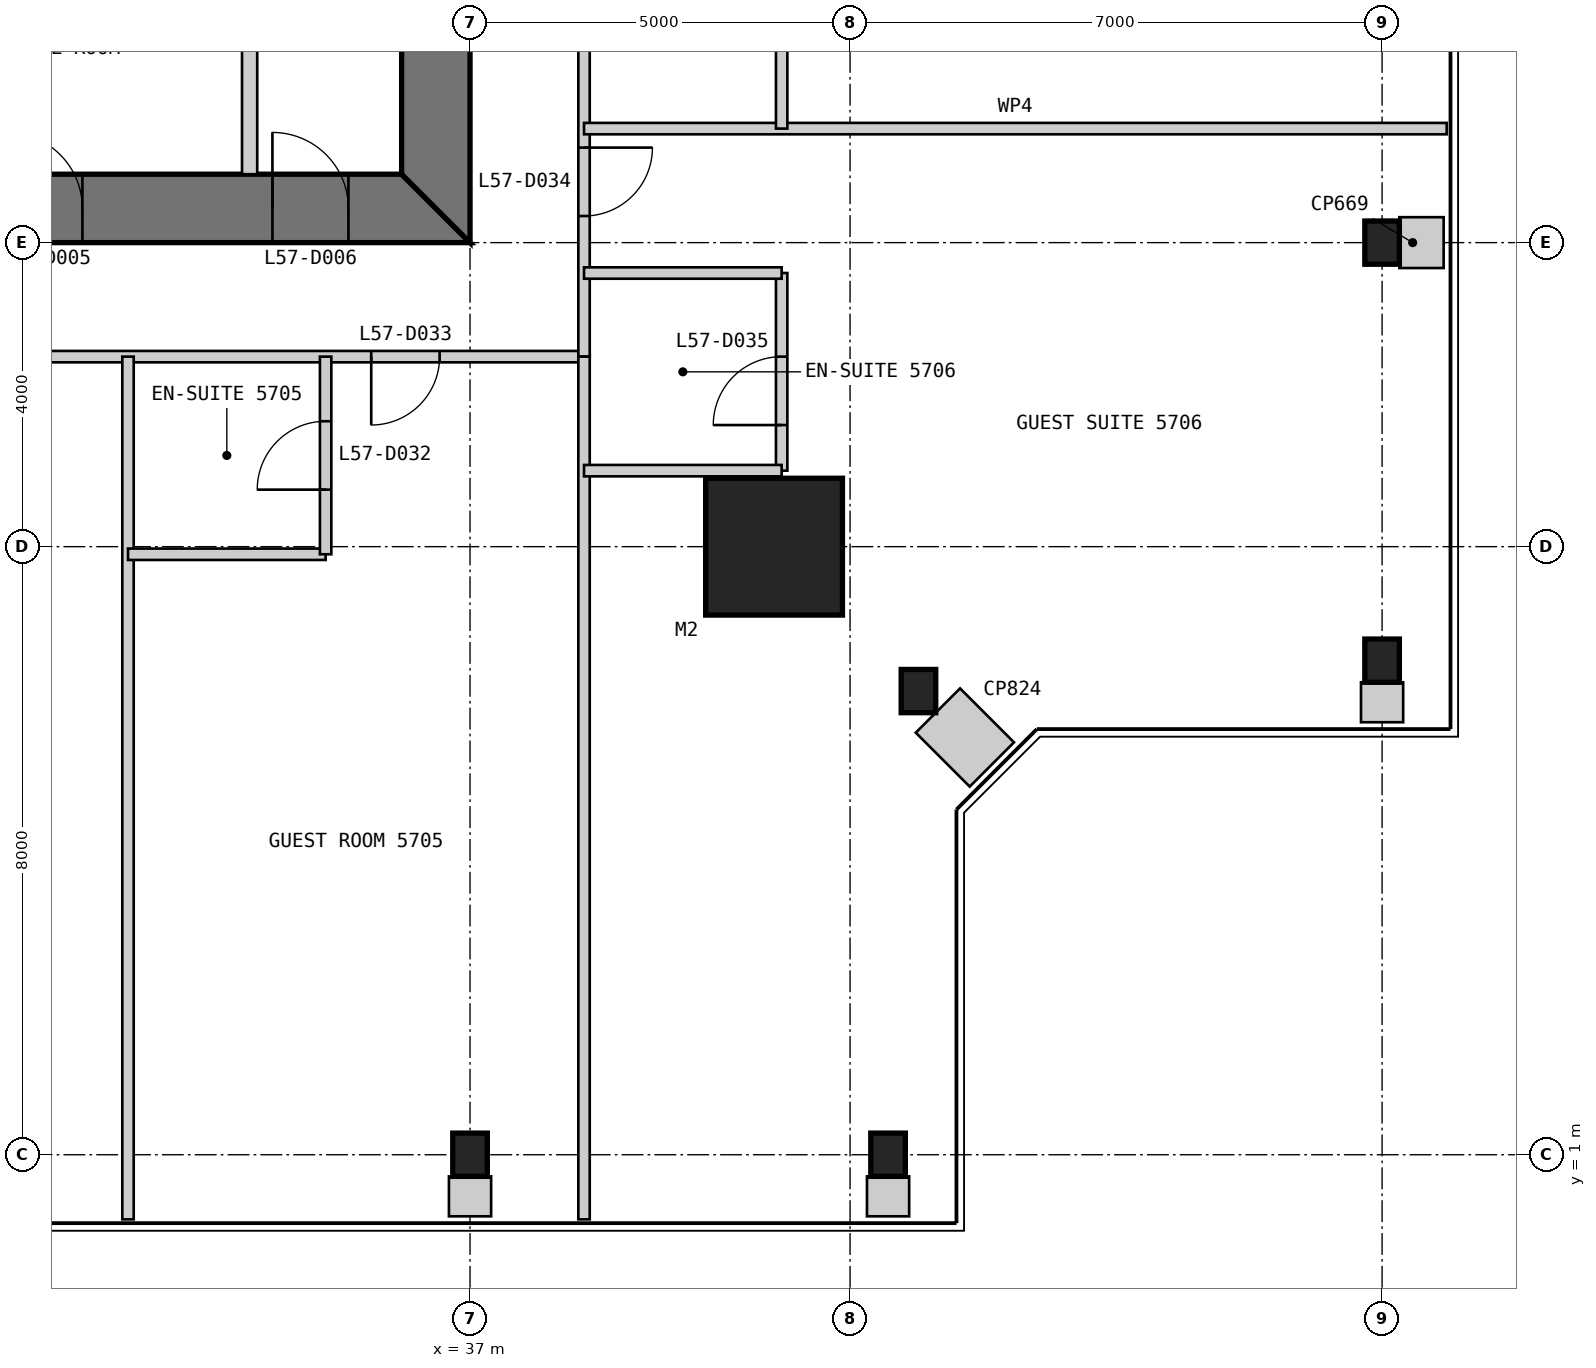
"""IFC4 building model, lengths in metres.
Left out: names, types, materials, properties, quantities, classifications, styles, units other than length and angle.
Written with IfcOpenShell. Run it as: python <this file> out.ifc"""

import sys

from ifc_helpers import new_model, si_unit, direction, frame, frame_2d, origin, origin_2d, place, context, subcontext, project, spatial, polyline, rectangle, i_section, outline, extrude, element, fill, save


model = new_model("IFC4")
c1 = context("Model", 3, precision=1e-05, world=origin(), true_north=direction((0.0, 1.0)))
c2 = subcontext(c1, "Body", "Model", "MODEL_VIEW")
j1 = project(units=[si_unit("LENGTHUNIT", "METRE"), si_unit("PLANEANGLEUNIT", "RADIAN")], contexts=[c1])
p1 = place(None, origin())
s1 = spatial("IfcSite", under=j1, at=p1, CompositionType="ELEMENT")
p2 = place(p1, origin())
s2 = spatial("IfcBuilding", under=s1, at=p2, CompositionType="ELEMENT")
p3 = place(p2, frame((0.0, 0.0, 245.8)))
s3 = spatial("IfcBuildingStorey", under=s2, at=p3, CompositionType="ELEMENT", Elevation=245.8)
p4 = place(p3, frame((41.0, 9.0, 0.0), z_axis=(0.0, 0.0, 1.0), x_axis=(1.0, 0.0, 0.0)))
e1 = element("IfcColumn", 1, at=p4, inside=s3, PredefinedType="COLUMN", context=c2, shape_type="SweptSolid", body=[
    extrude(rectangle(XDim=1.8, YDim=1.8, at=origin_2d()), origin(), (0.0, 0.0, 1.0), 3.4),
])
for number, where, z_axis, x_axis in (
    (2, (37.0, 1.0, 0.0), (0.0, 0.0, 1.0), (1.0, 0.0, 0.0)),
    (3, (42.5, 1.0, 0.0), (0.0, 0.0, 1.0), (1.0, 0.0, 0.0)),
    (4, (42.9, 7.1, 0.0), (0.0, 0.0, 1.0), (1.0, 0.0, 0.0)),
    (5, (49.0, 7.5, 0.0), (0.0, 0.0, 1.0), (1.0, 0.0, 0.0)),
    (6, (49.0, 13.0, 0.0), (0.0, 0.0, 1.0), (1.0, 0.0, 0.0)),
):
    element("IfcColumn", number, at=place(p3, frame(where, z_axis=z_axis, x_axis=x_axis)), inside=s3, PredefinedType="COLUMN", context=c2, shape_type="SweptSolid", body=[
        extrude(i_section(OverallWidth=0.455, OverallDepth=0.569, WebThickness=0.078, FlangeThickness=0.125, at=origin_2d()), origin(), (0.0, 0.0, 1.0), 3.4),
    ])
p5 = place(p3, frame((13.0, 13.45, 0.0), z_axis=(0.0, 0.0, 1.0), x_axis=(1.0, 0.0, 0.0)))
e7 = element("IfcWall", 7, at=p5, inside=s3, PredefinedType="SHEAR", context=c2, shape_type="SweptSolid", body=[
    extrude(outline(polyline([(0.0, -0.45), (24.0, -0.45), (23.1, 0.45), (0.9, 0.45), (0.0, -0.45)])), origin(), (0.0, 0.0, 1.0), 3.4),
])
p6 = place(p5, frame((4.9, 0.0, 0.0)))
e8 = element("IfcOpeningElement", 8, at=p6, cuts=e7, PredefinedType="OPENING", context=c2, shape_type="SweptSolid", body=[
    extrude(rectangle(XDim=1.0, YDim=2.2, at=frame_2d((0.5, 1.1))), frame((0.0, 0.46, 0.0), z_axis=(0.0, -1.0, 0.0), x_axis=(1.0, 0.0, 0.0)), (0.0, 0.0, 1.0), 0.92),
])
p7 = place(p5, frame((8.9, 0.0, 0.0)))
e9 = element("IfcOpeningElement", 9, at=p7, cuts=e7, PredefinedType="OPENING", context=c2, shape_type="SweptSolid", body=[
    extrude(rectangle(XDim=1.1, YDim=2.2, at=frame_2d((0.55, 1.1))), frame((0.0, 0.46, 0.0), z_axis=(0.0, -1.0, 0.0), x_axis=(1.0, 0.0, 0.0)), (0.0, 0.0, 1.0), 0.92),
])
p8 = place(p5, frame((15.05, 0.0, 0.0)))
e10 = element("IfcOpeningElement", 10, at=p8, cuts=e7, PredefinedType="OPENING", context=c2, shape_type="SweptSolid", body=[
    extrude(rectangle(XDim=0.9, YDim=2.2, at=frame_2d((0.45, 1.1))), frame((0.0, 0.46, 0.0), z_axis=(0.0, -1.0, 0.0), x_axis=(1.0, 0.0, 0.0)), (0.0, 0.0, 1.0), 0.92),
])
p9 = place(p5, frame((17.9, 0.0, 0.0)))
e11 = element("IfcOpeningElement", 11, at=p9, cuts=e7, PredefinedType="OPENING", context=c2, shape_type="SweptSolid", body=[
    extrude(rectangle(XDim=1.0, YDim=2.2, at=frame_2d((0.5, 1.1))), frame((0.0, 0.46, 0.0), z_axis=(0.0, -1.0, 0.0), x_axis=(1.0, 0.0, 0.0)), (0.0, 0.0, 1.0), 0.92),
])
p10 = place(p5, frame((21.4, 0.0, 0.0)))
e12 = element("IfcOpeningElement", 12, at=p10, cuts=e7, PredefinedType="OPENING", context=c2, shape_type="SweptSolid", body=[
    extrude(rectangle(XDim=1.0, YDim=2.2, at=frame_2d((0.5, 1.1))), frame((0.0, 0.46, 0.0), z_axis=(0.0, -1.0, 0.0), x_axis=(1.0, 0.0, 0.0)), (0.0, 0.0, 1.0), 0.92),
])
p11 = place(p3, frame((36.55, 13.9, 0.0), z_axis=(0.0, 0.0, 1.0), x_axis=(0.0, 1.0, 0.0)))
e13 = element("IfcWall", 13, at=p11, inside=s3, PredefinedType="SHEAR", context=c2, shape_type="SweptSolid", body=[
    extrude(outline(polyline([(-0.9, -0.45), (23.1, -0.45), (22.2, 0.45), (0.0, 0.45), (-0.9, -0.45)])), origin(), (0.0, 0.0, 1.0), 3.4),
])
p12 = place(p11, frame((20.2, 0.0, 0.0)))
e14 = element("IfcOpeningElement", 14, at=p12, cuts=e13, PredefinedType="OPENING", context=c2, shape_type="SweptSolid", body=[
    extrude(rectangle(XDim=1.0, YDim=2.2, at=frame_2d((0.5, 1.1))), frame((0.0, 0.46, 0.0), z_axis=(0.0, -1.0, 0.0), x_axis=(1.0, 0.0, 0.0)), (0.0, 0.0, 1.0), 0.92),
])
p13 = place(p11, frame((17.25, 0.0, 0.0)))
e15 = element("IfcOpeningElement", 15, at=p13, cuts=e13, PredefinedType="OPENING", context=c2, shape_type="SweptSolid", body=[
    extrude(rectangle(XDim=0.9, YDim=2.2, at=frame_2d((0.45, 1.1))), frame((0.0, 0.46, 0.0), z_axis=(0.0, -1.0, 0.0), x_axis=(1.0, 0.0, 0.0)), (0.0, 0.0, 1.0), 0.92),
])
p14 = place(p3, frame((34.1, 13.9, 0.0), z_axis=(0.0, 0.0, 1.0), x_axis=(0.0, 1.0, 0.0)))
e16 = element("IfcWall", 16, at=p14, inside=s3, PredefinedType="PARTITIONING", context=c2, shape_type="SweptSolid", body=[
    extrude(rectangle(XDim=6.1, YDim=0.2, at=frame_2d((3.05, 0.0))), origin(), (0.0, 0.0, 1.0), 3.2),
])
p15 = place(p3, frame((11.5, 11.5, 0.0), z_axis=(0.0, 0.0, 1.0), x_axis=(1.0, 0.0, 0.0)))
e17 = element("IfcWall", 17, at=p15, inside=s3, PredefinedType="PARTITIONING", context=c2, shape_type="SweptSolid", body=[
    extrude(rectangle(XDim=27.0, YDim=0.15, at=frame_2d((13.5, 0.0))), origin(), (0.0, 0.0, 1.0), 3.25),
])
p16 = place(p15, frame((1.85, 0.0, 0.0)))
e18 = element("IfcOpeningElement", 18, at=p16, cuts=e17, PredefinedType="OPENING", context=c2, shape_type="SweptSolid", body=[
    extrude(rectangle(XDim=0.9, YDim=2.1, at=frame_2d((0.45, 1.05))), frame((0.0, 0.085, 0.0), z_axis=(0.0, -1.0, 0.0), x_axis=(1.0, 0.0, 0.0)), (0.0, 0.0, 1.0), 0.17),
])
p17 = place(p15, frame((6.2, 0.0, 0.0)))
e19 = element("IfcOpeningElement", 19, at=p17, cuts=e17, PredefinedType="OPENING", context=c2, shape_type="SweptSolid", body=[
    extrude(rectangle(XDim=0.9, YDim=2.1, at=frame_2d((0.45, 1.05))), frame((0.0, 0.085, 0.0), z_axis=(0.0, -1.0, 0.0), x_axis=(1.0, 0.0, 0.0)), (0.0, 0.0, 1.0), 0.17),
])
p18 = place(p15, frame((12.2, 0.0, 0.0)))
e20 = element("IfcOpeningElement", 20, at=p18, cuts=e17, PredefinedType="OPENING", context=c2, shape_type="SweptSolid", body=[
    extrude(rectangle(XDim=0.9, YDim=2.1, at=frame_2d((0.45, 1.05))), frame((0.0, 0.085, 0.0), z_axis=(0.0, -1.0, 0.0), x_axis=(1.0, 0.0, 0.0)), (0.0, 0.0, 1.0), 0.17),
])
p19 = place(p15, frame((18.8, 0.0, 0.0)))
e21 = element("IfcOpeningElement", 21, at=p19, cuts=e17, PredefinedType="OPENING", context=c2, shape_type="SweptSolid", body=[
    extrude(rectangle(XDim=1.0, YDim=2.1, at=frame_2d((0.5, 1.05))), frame((0.0, 0.085, 0.0), z_axis=(0.0, -1.0, 0.0), x_axis=(1.0, 0.0, 0.0)), (0.0, 0.0, 1.0), 0.17),
])
p20 = place(p15, frame((24.2, 0.0, 0.0)))
e22 = element("IfcOpeningElement", 22, at=p20, cuts=e17, PredefinedType="OPENING", context=c2, shape_type="SweptSolid", body=[
    extrude(rectangle(XDim=0.9, YDim=2.1, at=frame_2d((0.45, 1.05))), frame((0.0, 0.085, 0.0), z_axis=(0.0, -1.0, 0.0), x_axis=(1.0, 0.0, 0.0)), (0.0, 0.0, 1.0), 0.17),
])
p21 = place(p3, frame((32.5, 0.15, 0.0), z_axis=(0.0, 0.0, 1.0), x_axis=(0.0, 1.0, 0.0)))
e23 = element("IfcWall", 23, at=p21, inside=s3, PredefinedType="PARTITIONING", context=c2, shape_type="SweptSolid", body=[
    extrude(rectangle(XDim=11.35, YDim=0.15, at=frame_2d((5.675, 0.0))), origin(), (0.0, 0.0, 1.0), 3.25),
])
p22 = place(p3, frame((32.5, 8.9, 0.0), z_axis=(0.0, 0.0, 1.0), x_axis=(1.0, 0.0, 0.0)))
e24 = element("IfcWall", 24, at=p22, inside=s3, PredefinedType="PARTITIONING", context=c2, shape_type="SweptSolid", body=[
    extrude(rectangle(XDim=2.6, YDim=0.15, at=frame_2d((1.3, 0.0))), origin(), (0.0, 0.0, 1.0), 3.25),
])
p23 = place(p3, frame((35.1, 8.9, 0.0), z_axis=(0.0, 0.0, 1.0), x_axis=(0.0, 1.0, 0.0)))
e25 = element("IfcWall", 25, at=p23, inside=s3, PredefinedType="PARTITIONING", context=c2, shape_type="SweptSolid", body=[
    extrude(rectangle(XDim=2.6, YDim=0.15, at=frame_2d((1.3, 0.0))), origin(), (0.0, 0.0, 1.0), 3.25),
])
p24 = place(p23, frame((0.85, 0.0, 0.0)))
e26 = element("IfcOpeningElement", 26, at=p24, cuts=e25, PredefinedType="OPENING", context=c2, shape_type="SweptSolid", body=[
    extrude(rectangle(XDim=0.9, YDim=2.1, at=frame_2d((0.45, 1.05))), frame((0.0, 0.085, 0.0), z_axis=(0.0, -1.0, 0.0), x_axis=(1.0, 0.0, 0.0)), (0.0, 0.0, 1.0), 0.17),
])
p25 = place(p3, frame((38.5, 11.5, 0.0), z_axis=(0.0, 0.0, 1.0), x_axis=(0.0, 1.0, 0.0)))
e27 = element("IfcWall", 27, at=p25, inside=s3, PredefinedType="PARTITIONING", context=c2, shape_type="SweptSolid", body=[
    extrude(rectangle(XDim=27.0, YDim=0.15, at=frame_2d((13.5, 0.0))), origin(), (0.0, 0.0, 1.0), 3.25),
])
p26 = place(p25, frame((1.85, 0.0, 0.0)))
e28 = element("IfcOpeningElement", 28, at=p26, cuts=e27, PredefinedType="OPENING", context=c2, shape_type="SweptSolid", body=[
    extrude(rectangle(XDim=0.9, YDim=2.1, at=frame_2d((0.45, 1.05))), frame((0.0, 0.085, 0.0), z_axis=(0.0, -1.0, 0.0), x_axis=(1.0, 0.0, 0.0)), (0.0, 0.0, 1.0), 0.17),
])
p27 = place(p25, frame((6.2, 0.0, 0.0)))
e29 = element("IfcOpeningElement", 29, at=p27, cuts=e27, PredefinedType="OPENING", context=c2, shape_type="SweptSolid", body=[
    extrude(rectangle(XDim=0.9, YDim=2.1, at=frame_2d((0.45, 1.05))), frame((0.0, 0.085, 0.0), z_axis=(0.0, -1.0, 0.0), x_axis=(1.0, 0.0, 0.0)), (0.0, 0.0, 1.0), 0.17),
])
p28 = place(p25, frame((12.2, 0.0, 0.0)))
e30 = element("IfcOpeningElement", 30, at=p28, cuts=e27, PredefinedType="OPENING", context=c2, shape_type="SweptSolid", body=[
    extrude(rectangle(XDim=0.9, YDim=2.1, at=frame_2d((0.45, 1.05))), frame((0.0, 0.085, 0.0), z_axis=(0.0, -1.0, 0.0), x_axis=(1.0, 0.0, 0.0)), (0.0, 0.0, 1.0), 0.17),
])
p29 = place(p25, frame((18.2, 0.0, 0.0)))
e31 = element("IfcOpeningElement", 31, at=p29, cuts=e27, PredefinedType="OPENING", context=c2, shape_type="SweptSolid", body=[
    extrude(rectangle(XDim=0.9, YDim=2.1, at=frame_2d((0.45, 1.05))), frame((0.0, 0.085, 0.0), z_axis=(0.0, -1.0, 0.0), x_axis=(1.0, 0.0, 0.0)), (0.0, 0.0, 1.0), 0.17),
])
p30 = place(p25, frame((24.2, 0.0, 0.0)))
e32 = element("IfcOpeningElement", 32, at=p30, cuts=e27, PredefinedType="OPENING", context=c2, shape_type="SweptSolid", body=[
    extrude(rectangle(XDim=0.9, YDim=2.1, at=frame_2d((0.45, 1.05))), frame((0.0, 0.085, 0.0), z_axis=(0.0, -1.0, 0.0), x_axis=(1.0, 0.0, 0.0)), (0.0, 0.0, 1.0), 0.17),
])
p31 = place(p3, frame((38.5, 0.15, 0.0), z_axis=(0.0, 0.0, 1.0), x_axis=(0.0, 1.0, 0.0)))
e33 = element("IfcWall", 33, at=p31, inside=s3, PredefinedType="PARTITIONING", context=c2, shape_type="SweptSolid", body=[
    extrude(rectangle(XDim=11.35, YDim=0.15, at=frame_2d((5.675, 0.0))), origin(), (0.0, 0.0, 1.0), 3.25),
])
p32 = place(p3, frame((41.1, 10.0, 0.0), z_axis=(0.0, 0.0, 1.0), x_axis=(0.0, 1.0, 0.0)))
e34 = element("IfcWall", 34, at=p32, inside=s3, PredefinedType="PARTITIONING", context=c2, shape_type="SweptSolid", body=[
    extrude(rectangle(XDim=2.6, YDim=0.15, at=frame_2d((1.3, 0.0))), origin(), (0.0, 0.0, 1.0), 2.638),
])
p33 = place(p32, frame((0.6, 0.0, 0.0)))
e35 = element("IfcOpeningElement", 35, at=p33, cuts=e34, PredefinedType="OPENING", context=c2, shape_type="SweptSolid", body=[
    extrude(rectangle(XDim=0.9, YDim=2.1, at=frame_2d((0.45, 1.05))), frame((0.0, 0.085, 0.0), z_axis=(0.0, -1.0, 0.0), x_axis=(1.0, 0.0, 0.0)), (0.0, 0.0, 1.0), 0.17),
])
for number, where, z_axis, x_axis in (
    (36, (41.1, 10.0, 0.0), (0.0, 0.0, 1.0), (-1.0, 0.0, 0.0)),
    (37, (41.1, 12.6, 0.0), (0.0, 0.0, 1.0), (-1.0, 0.0, 0.0)),
):
    element("IfcWall", number, at=place(p3, frame(where, z_axis=z_axis, x_axis=x_axis)), inside=s3, PredefinedType="PARTITIONING", context=c2, shape_type="SweptSolid", body=[
        extrude(rectangle(XDim=2.6, YDim=0.15, at=frame_2d((1.3, 0.0))), origin(), (0.0, 0.0, 1.0), 3.25),
    ])
p34 = place(p3, frame((49.85, 14.5, 0.0), z_axis=(0.0, 0.0, 1.0), x_axis=(-1.0, 0.0, 0.0)))
e38 = element("IfcWall", 38, at=p34, inside=s3, PredefinedType="PARTITIONING", context=c2, shape_type="SweptSolid", body=[
    extrude(rectangle(XDim=11.35, YDim=0.15, at=frame_2d((5.675, 0.0))), origin(), (0.0, 0.0, 1.0), 3.25),
])
p35 = place(p3, frame((41.1, 14.5, 0.0), z_axis=(0.0, 0.0, 1.0), x_axis=(0.0, 1.0, 0.0)))
e39 = element("IfcWall", 39, at=p35, inside=s3, PredefinedType="PARTITIONING", context=c2, shape_type="SweptSolid", body=[
    extrude(rectangle(XDim=2.6, YDim=0.15, at=frame_2d((1.3, 0.0))), origin(), (0.0, 0.0, 1.0), 3.25),
])
for number, where, z_axis, x_axis in (
    (40, (37.0, 0.19, 0.0), (0.0, 0.0, 1.0), (0.0, 1.0, 0.0)),
    (41, (42.5, 0.19, 0.0), (0.0, 0.0, 1.0), (0.0, 1.0, 0.0)),
):
    element("IfcWall", number, at=place(p3, frame(where, z_axis=z_axis, x_axis=x_axis)), inside=s3, PredefinedType="PARTITIONING", context=c2, shape_type="SweptSolid", body=[
        extrude(rectangle(XDim=0.526, YDim=0.555, at=frame_2d((0.263, 0.0))), origin(), (0.0, 0.0, 1.0), 3.25),
    ])
p36 = place(p3, frame((43.866, 6.134, 0.0), z_axis=(0.0, 0.0, 1.0), x_axis=(-0.707106781187, 0.707106781187, 0.0)))
e42 = element("IfcWall", 42, at=p36, inside=s3, PredefinedType="PARTITIONING", context=c2, shape_type="SweptSolid", body=[
    extrude(rectangle(XDim=1.004, YDim=0.824, at=frame_2d((0.502, 0.0))), origin(), (0.0, 0.0, 1.0), 3.25),
])
p37 = place(p3, frame((49.0, 6.69, 0.0), z_axis=(0.0, 0.0, 1.0), x_axis=(0.0, 1.0, 0.0)))
e43 = element("IfcWall", 43, at=p37, inside=s3, PredefinedType="PARTITIONING", context=c2, shape_type="SweptSolid", body=[
    extrude(rectangle(XDim=0.526, YDim=0.555, at=frame_2d((0.263, 0.0))), origin(), (0.0, 0.0, 1.0), 3.25),
])
p38 = place(p3, frame((49.81, 13.0, 0.0), z_axis=(0.0, 0.0, 1.0), x_axis=(-1.0, 0.0, 0.0)))
e44 = element("IfcWall", 44, at=p38, inside=s3, PredefinedType="PARTITIONING", context=c2, shape_type="SweptSolid", body=[
    extrude(rectangle(XDim=0.583, YDim=0.669, at=frame_2d((0.292, 0.0))), origin(), (0.0, 0.0, 1.0), 3.25),
])
p39 = place(p9, origin())
e45 = element("IfcDoor", 45, at=p39, inside=s3, OperationType="SINGLE_SWING_LEFT", PredefinedType="DOOR", context=c2, shape_type="SweptSolid", body=[
    extrude(rectangle(XDim=1.0, YDim=2.2, at=frame_2d((0.5, 1.1))), frame((0.0, 0.025, 0.0), z_axis=(0.0, -1.0, 0.0), x_axis=(1.0, 0.0, 0.0)), (0.0, 0.0, 1.0), 0.05),
    extrude(outline(polyline([(0.0, 0.0), (0.04, 0.0), (0.04, 2.16), (0.96, 2.16), (0.96, 0.0), (1.0, 0.0), (1.0, 2.2), (0.0, 2.2), (0.0, 0.0)])), frame((0.0, 0.3, 0.0), z_axis=(0.0, -1.0, 0.0), x_axis=(1.0, 0.0, 0.0)), (0.0, 0.0, 1.0), 0.6),
])
fill(e11, e45)
p40 = place(p10, origin())
e46 = element("IfcDoor", 46, at=p40, inside=s3, OperationType="SINGLE_SWING_LEFT", PredefinedType="DOOR", context=c2, shape_type="SweptSolid", body=[
    extrude(rectangle(XDim=1.0, YDim=2.2, at=frame_2d((0.5, 1.1))), frame((0.0, 0.025, 0.0), z_axis=(0.0, -1.0, 0.0), x_axis=(1.0, 0.0, 0.0)), (0.0, 0.0, 1.0), 0.05),
    extrude(outline(polyline([(0.0, 0.0), (0.04, 0.0), (0.04, 2.16), (0.96, 2.16), (0.96, 0.0), (1.0, 0.0), (1.0, 2.2), (0.0, 2.2), (0.0, 0.0)])), frame((0.0, 0.3, 0.0), z_axis=(0.0, -1.0, 0.0), x_axis=(1.0, 0.0, 0.0)), (0.0, 0.0, 1.0), 0.6),
])
fill(e12, e46)
p41 = place(p24, origin())
e47 = element("IfcDoor", 47, at=p41, inside=s3, OperationType="SINGLE_SWING_LEFT", PredefinedType="DOOR", context=c2, shape_type="SweptSolid", body=[
    extrude(rectangle(XDim=0.9, YDim=2.1, at=frame_2d((0.45, 1.05))), frame((0.0, 0.025, 0.0), z_axis=(0.0, -1.0, 0.0), x_axis=(1.0, 0.0, 0.0)), (0.0, 0.0, 1.0), 0.05),
])
fill(e26, e47)
p42 = place(p20, frame((0.9, 0.0, 0.0), z_axis=(0.0, 0.0, 1.0), x_axis=(-1.0, 0.0, 0.0)))
e48 = element("IfcDoor", 48, at=p42, inside=s3, OperationType="SINGLE_SWING_RIGHT", PredefinedType="DOOR", context=c2, shape_type="SweptSolid", body=[
    extrude(rectangle(XDim=0.9, YDim=2.1, at=frame_2d((0.45, 1.05))), frame((0.0, 0.025, 0.0), z_axis=(0.0, -1.0, 0.0), x_axis=(1.0, 0.0, 0.0)), (0.0, 0.0, 1.0), 0.05),
])
fill(e22, e48)
p43 = place(p26, frame((0.9, 0.0, 0.0), z_axis=(0.0, 0.0, 1.0), x_axis=(-1.0, 0.0, 0.0)))
e49 = element("IfcDoor", 49, at=p43, inside=s3, OperationType="SINGLE_SWING_LEFT", PredefinedType="DOOR", context=c2, shape_type="SweptSolid", body=[
    extrude(rectangle(XDim=0.9, YDim=2.1, at=frame_2d((0.45, 1.05))), frame((0.0, 0.025, 0.0), z_axis=(0.0, -1.0, 0.0), x_axis=(1.0, 0.0, 0.0)), (0.0, 0.0, 1.0), 0.05),
])
fill(e28, e49)
p44 = place(p33, origin())
e50 = element("IfcDoor", 50, at=p44, inside=s3, OperationType="SINGLE_SWING_LEFT", PredefinedType="DOOR", context=c2, shape_type="SweptSolid", body=[
    extrude(rectangle(XDim=0.9, YDim=2.1, at=frame_2d((0.45, 1.05))), frame((0.0, 0.025, 0.0), z_axis=(0.0, -1.0, 0.0), x_axis=(1.0, 0.0, 0.0)), (0.0, 0.0, 1.0), 0.05),
])
fill(e35, e50)
save(model, sys.argv[1])
